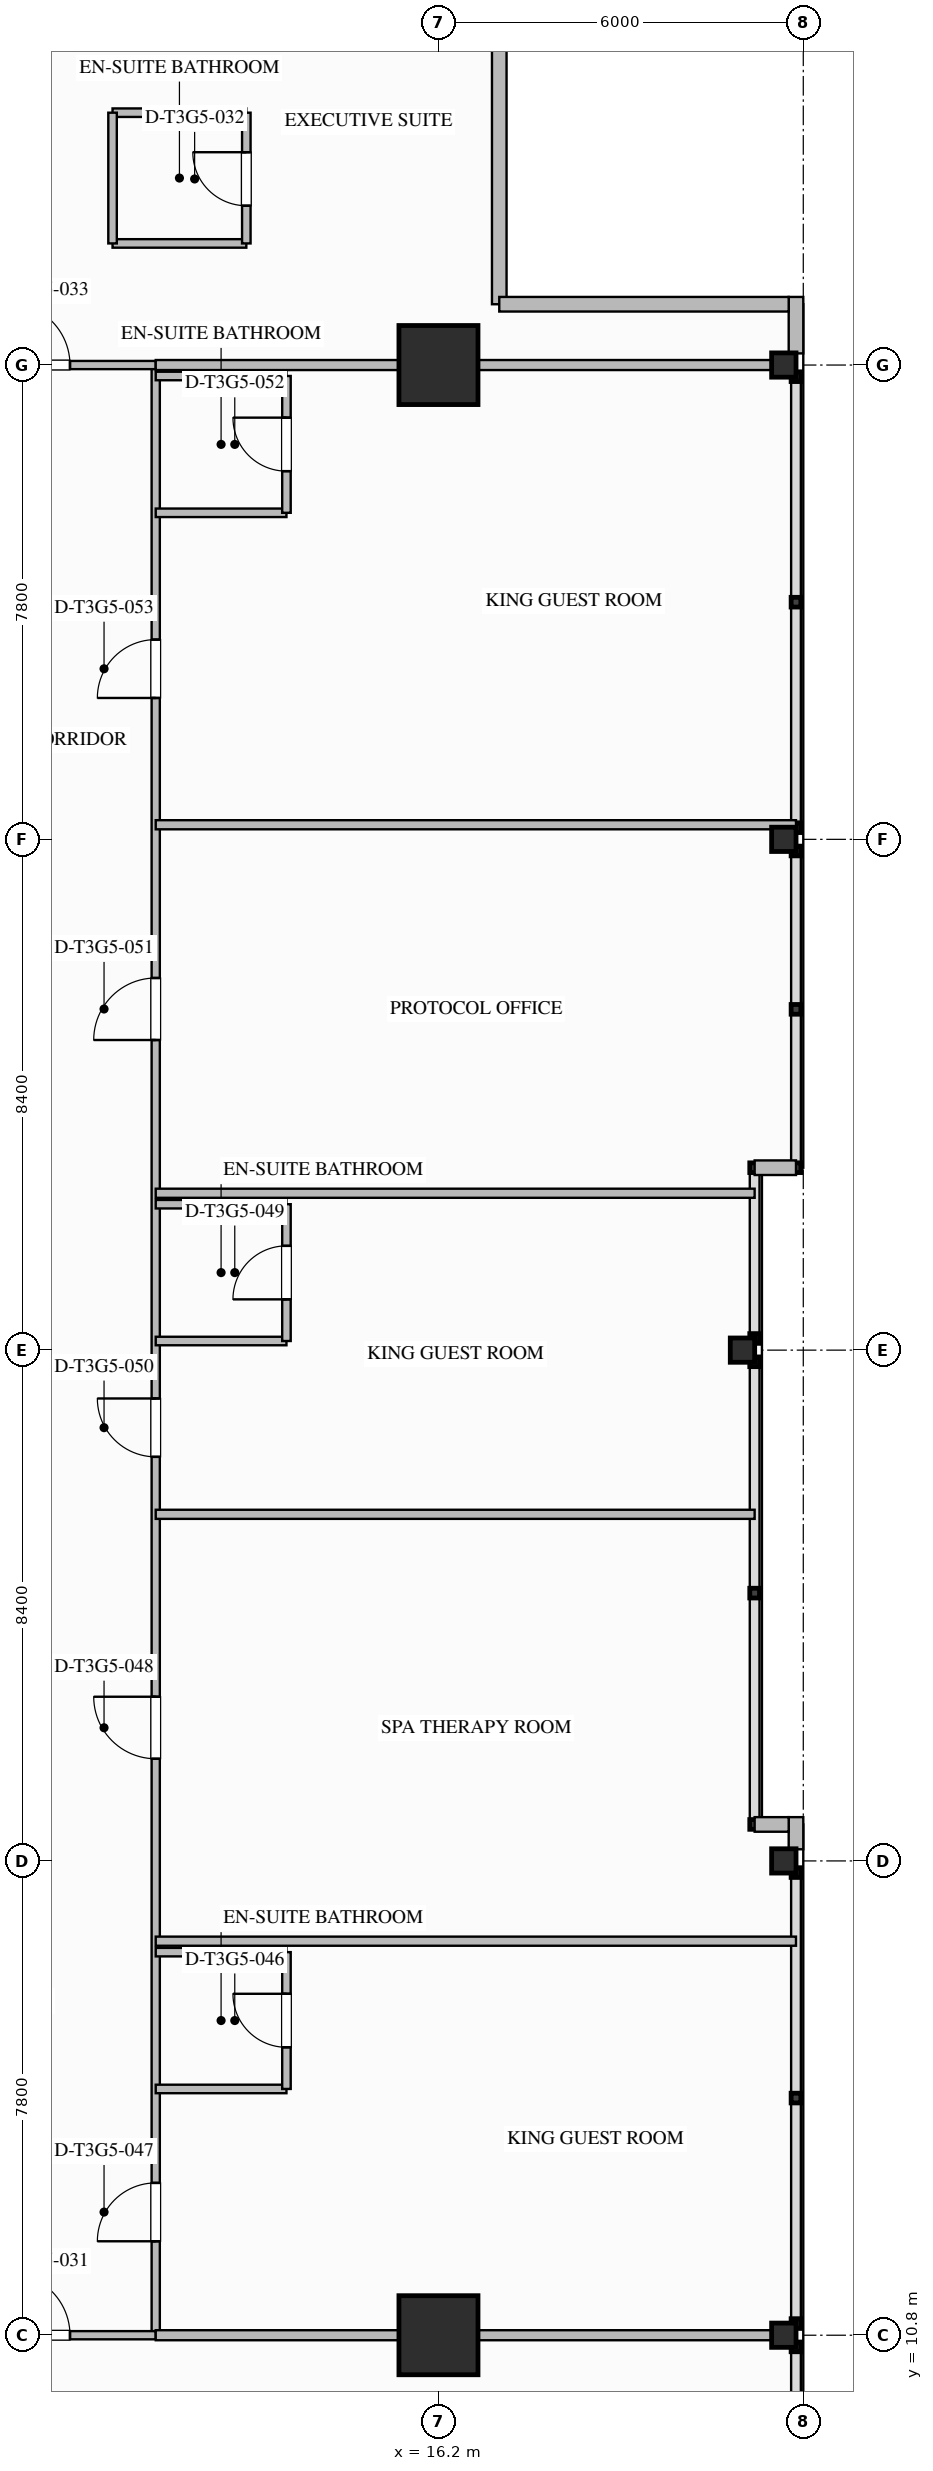
"""IFC4 building model, lengths in metres.
Left out: names, types, materials, properties, quantities, classifications, styles, units other than length and angle.
Written with IfcOpenShell. Run it as: python <this file> out.ifc"""

import sys

from ifc_helpers import new_model, si_unit, direction, frame, frame_2d, origin, origin_2d, place, context, subcontext, project, spatial, rectangle, i_section, extrude, element, fill, save


model = new_model("IFC4")
c1 = context("Model", 3, precision=1e-05, world=origin(), true_north=direction((0.0, 1.0)))
c2 = subcontext(c1, "Body", "Model", "MODEL_VIEW")
j1 = project(units=[si_unit("LENGTHUNIT", "METRE"), si_unit("PLANEANGLEUNIT", "RADIAN")], contexts=[c1])
p1 = place(None, origin())
s1 = spatial("IfcSite", under=j1, at=p1, CompositionType="ELEMENT")
p2 = place(p1, origin())
s2 = spatial("IfcBuilding", under=s1, at=p2, CompositionType="ELEMENT")
p3 = place(p2, frame((0.0, 0.0, 193.0)))
s3 = spatial("IfcBuildingStorey", under=s2, at=p3, CompositionType="ELEMENT", Elevation=193.0)
for number, where, z_axis, x_axis in (
    (1, (16.2, 10.8, 0.0), (0.0, 0.0, 1.0), (1.0, 0.0, 0.0)),
    (2, (16.2, 43.2, 0.0), (0.0, 0.0, 1.0), (1.0, 0.0, 0.0)),
):
    element("IfcColumn", number, at=place(p3, frame(where, z_axis=z_axis, x_axis=x_axis)), inside=s3, PredefinedType="COLUMN", context=c2, shape_type="SweptSolid", body=[
        extrude(rectangle(XDim=1.3, YDim=1.3, at=origin_2d()), origin(), (0.0, 0.0, 1.0), 3.55),
    ])
for number, where, z_axis, x_axis in (
    (3, (21.88, 10.8, 0.0), (0.0, 0.0, 1.0), (1.0, 0.0, 0.0)),
    (4, (21.88, 18.6, 0.0), (0.0, 0.0, 1.0), (1.0, 0.0, 0.0)),
    (5, (21.2, 27.0, 0.0), (0.0, 0.0, 1.0), (1.0, 0.0, 0.0)),
    (6, (21.88, 35.4, 0.0), (0.0, 0.0, 1.0), (1.0, 0.0, 0.0)),
    (7, (21.88, 43.2, 0.0), (0.0, 0.0, 1.0), (1.0, 0.0, 0.0)),
):
    element("IfcColumn", number, at=place(p3, frame(where, z_axis=z_axis, x_axis=x_axis)), inside=s3, PredefinedType="COLUMN", context=c2, shape_type="SweptSolid", body=[
        extrude(i_section(OverallWidth=0.401, OverallDepth=0.399, WebThickness=0.025, FlangeThickness=0.04, FilletRadius=0.025, at=origin_2d()), origin(), (0.0, 0.0, 1.0), 3.547),
    ])
p4 = place(p3, frame((22.08, 44.32, 0.0), z_axis=(0.0, 0.0, 1.0), x_axis=(0.0, -1.0, 0.0)))
e8 = element("IfcWall", 8, at=p4, inside=s3, PredefinedType="STANDARD", context=c2, shape_type="SweptSolid", body=[
    extrude(rectangle(XDim=0.928, YDim=0.24, at=frame_2d((0.464, 0.0))), origin(), (0.0, 0.0, 1.0), 3.29),
])
p5 = place(p3, frame((22.08, 19.32, 0.0), z_axis=(0.0, 0.0, 1.0), x_axis=(0.0, -1.0, 0.0)))
e9 = element("IfcWall", 9, at=p5, inside=s3, PredefinedType="STANDARD", context=c2, shape_type="SweptSolid", body=[
    extrude(rectangle(XDim=0.528, YDim=0.24, at=frame_2d((0.264, 0.0))), origin(), (0.0, 0.0, 1.0), 3.29),
])
for number, where, z_axis, x_axis in (
    (10, (17.2, 48.96, 0.0), (0.0, 0.0, 1.0), (0.0, -1.0, 0.0)),
    (11, (17.2, 44.2, 0.0), (0.0, 0.0, 1.0), (1.0, 0.0, 0.0)),
):
    element("IfcWall", number, at=place(p3, frame(where, z_axis=z_axis, x_axis=x_axis)), inside=s3, PredefinedType="STANDARD", context=c2, shape_type="SweptSolid", body=[
        extrude(rectangle(XDim=4.76, YDim=0.24, at=frame_2d((2.38, 0.0))), origin(), (0.0, 0.0, 1.0), 3.29),
    ])
p6 = place(p3, frame((22.08, 30.0, 0.0), z_axis=(0.0, 0.0, 1.0), x_axis=(-1.0, 0.0, 0.0)))
e12 = element("IfcWall", 12, at=p6, inside=s3, PredefinedType="STANDARD", context=c2, shape_type="SweptSolid", body=[
    extrude(rectangle(XDim=0.68, YDim=0.24, at=frame_2d((0.34, 0.0))), origin(), (0.0, 0.0, 1.0), 3.29),
])
p7 = place(p3, frame((21.4, 19.2, 0.0), z_axis=(0.0, 0.0, 1.0), x_axis=(1.0, 0.0, 0.0)))
e13 = element("IfcWall", 13, at=p7, inside=s3, PredefinedType="STANDARD", context=c2, shape_type="SweptSolid", body=[
    extrude(rectangle(XDim=0.56, YDim=0.24, at=frame_2d((0.28, 0.0))), origin(), (0.0, 0.0, 1.0), 3.29),
])
p8 = place(p3, frame((11.55, 10.8, 0.0), z_axis=(0.0, 0.0, 1.0), x_axis=(0.0, 1.0, 0.0)))
e14 = element("IfcWall", 14, at=p8, inside=s3, PredefinedType="PARTITIONING", context=c2, shape_type="SweptSolid", body=[
    extrude(rectangle(XDim=32.4, YDim=0.135, at=frame_2d((16.2, 0.0))), origin(), (0.0, 0.0, 1.0), 3.29),
])
p9 = place(p8, frame((1.545, 0.0, 0.0)))
e15 = element("IfcOpeningElement", 15, at=p9, cuts=e14, PredefinedType="OPENING", context=c2, shape_type="SweptSolid", body=[
    extrude(rectangle(XDim=0.96, YDim=2.15, at=frame_2d((0.48, 1.075))), frame((0.0, 0.077, 0.0), z_axis=(0.0, -1.0, 0.0), x_axis=(1.0, 0.0, 0.0)), (0.0, 0.0, 1.0), 0.155),
])
p10 = place(p8, frame((9.48, 0.0, 0.0)))
e16 = element("IfcOpeningElement", 16, at=p10, cuts=e14, PredefinedType="OPENING", context=c2, shape_type="SweptSolid", body=[
    extrude(rectangle(XDim=1.02, YDim=2.15, at=frame_2d((0.51, 1.075))), frame((0.0, 0.077, 0.0), z_axis=(0.0, -1.0, 0.0), x_axis=(1.0, 0.0, 0.0)), (0.0, 0.0, 1.0), 0.155),
])
p11 = place(p8, frame((14.445, 0.0, 0.0)))
e17 = element("IfcOpeningElement", 17, at=p11, cuts=e14, PredefinedType="OPENING", context=c2, shape_type="SweptSolid", body=[
    extrude(rectangle(XDim=0.96, YDim=2.15, at=frame_2d((0.48, 1.075))), frame((0.0, 0.077, 0.0), z_axis=(0.0, -1.0, 0.0), x_axis=(1.0, 0.0, 0.0)), (0.0, 0.0, 1.0), 0.155),
])
p12 = place(p8, frame((21.3, 0.0, 0.0)))
e18 = element("IfcOpeningElement", 18, at=p12, cuts=e14, PredefinedType="OPENING", context=c2, shape_type="SweptSolid", body=[
    extrude(rectangle(XDim=1.02, YDim=2.15, at=frame_2d((0.51, 1.075))), frame((0.0, 0.077, 0.0), z_axis=(0.0, -1.0, 0.0), x_axis=(1.0, 0.0, 0.0)), (0.0, 0.0, 1.0), 0.155),
])
p13 = place(p8, frame((26.925, 0.0, 0.0)))
e19 = element("IfcOpeningElement", 19, at=p13, cuts=e14, PredefinedType="OPENING", context=c2, shape_type="SweptSolid", body=[
    extrude(rectangle(XDim=0.96, YDim=2.15, at=frame_2d((0.48, 1.075))), frame((0.0, 0.077, 0.0), z_axis=(0.0, -1.0, 0.0), x_axis=(1.0, 0.0, 0.0)), (0.0, 0.0, 1.0), 0.155),
])
p14 = place(p3, frame((8.6, 10.8, 0.0), z_axis=(0.0, 0.0, 1.0), x_axis=(1.0, 0.0, 0.0)))
e20 = element("IfcWall", 20, at=p14, inside=s3, PredefinedType="PARTITIONING", context=c2, shape_type="SweptSolid", body=[
    extrude(rectangle(XDim=2.95, YDim=0.135, at=frame_2d((1.475, 0.0))), origin(), (0.0, 0.0, 1.0), 2.58),
])
p15 = place(p14, frame((0.52, 0.0, 0.0)))
e21 = element("IfcOpeningElement", 21, at=p15, cuts=e20, PredefinedType="OPENING", context=c2, shape_type="SweptSolid", body=[
    extrude(rectangle(XDim=1.02, YDim=2.15, at=frame_2d((0.51, 1.075))), frame((0.0, 0.077, 0.0), z_axis=(0.0, -1.0, 0.0), x_axis=(1.0, 0.0, 0.0)), (0.0, 0.0, 1.0), 0.155),
])
p16 = place(p3, frame((8.6, 43.2, 0.0), z_axis=(0.0, 0.0, 1.0), x_axis=(1.0, 0.0, 0.0)))
e22 = element("IfcWall", 22, at=p16, inside=s3, PredefinedType="PARTITIONING", context=c2, shape_type="SweptSolid", body=[
    extrude(rectangle(XDim=2.95, YDim=0.135, at=frame_2d((1.475, 0.0))), origin(), (0.0, 0.0, 1.0), 2.58),
])
p17 = place(p16, frame((0.52, 0.0, 0.0)))
e23 = element("IfcOpeningElement", 23, at=p17, cuts=e22, PredefinedType="OPENING", context=c2, shape_type="SweptSolid", body=[
    extrude(rectangle(XDim=1.02, YDim=2.15, at=frame_2d((0.51, 1.075))), frame((0.0, 0.077, 0.0), z_axis=(0.0, -1.0, 0.0), x_axis=(1.0, 0.0, 0.0)), (0.0, 0.0, 1.0), 0.155),
])
for number, where, z_axis, x_axis in (
    (24, (11.55, 10.8, 0.0), (0.0, 0.0, 1.0), (1.0, 0.0, 0.0)),
    (25, (11.55, 43.2, 0.0), (0.0, 0.0, 1.0), (1.0, 0.0, 0.0)),
):
    element("IfcWall", number, at=place(p3, frame(where, z_axis=z_axis, x_axis=x_axis)), inside=s3, PredefinedType="PARTITIONING", context=c2, shape_type="SweptSolid", body=[
        extrude(rectangle(XDim=10.53, YDim=0.165, at=frame_2d((5.265, 0.0))), origin(), (0.0, 0.0, 1.0), 2.58),
    ])
for number, where, z_axis, x_axis in (
    (26, (10.84, 45.2, 0.0), (0.0, 0.0, 1.0), (1.0, 0.0, 0.0)),
    (27, (10.84, 47.35, 0.0), (0.0, 0.0, 1.0), (1.0, 0.0, 0.0)),
):
    element("IfcWall", number, at=place(p3, frame(where, z_axis=z_axis, x_axis=x_axis)), inside=s3, PredefinedType="PLUMBINGWALL", context=c2, shape_type="SweptSolid", body=[
        extrude(rectangle(XDim=2.2, YDim=0.14, at=frame_2d((1.1, 0.0))), origin(), (0.0, 0.0, 1.0), 3.29),
    ])
p18 = place(p3, frame((10.84, 45.2, 0.0), z_axis=(0.0, 0.0, 1.0), x_axis=(0.0, 1.0, 0.0)))
e28 = element("IfcWall", 28, at=p18, inside=s3, PredefinedType="PLUMBINGWALL", context=c2, shape_type="SweptSolid", body=[
    extrude(rectangle(XDim=2.15, YDim=0.14, at=frame_2d((1.075, 0.0))), origin(), (0.0, 0.0, 1.0), 3.29),
])
p19 = place(p3, frame((13.04, 45.2, 0.0), z_axis=(0.0, 0.0, 1.0), x_axis=(0.0, 1.0, 0.0)))
e29 = element("IfcWall", 29, at=p19, inside=s3, PredefinedType="PLUMBINGWALL", context=c2, shape_type="SweptSolid", body=[
    extrude(rectangle(XDim=2.15, YDim=0.14, at=frame_2d((1.075, 0.0))), origin(), (0.0, 0.0, 1.0), 3.29),
])
p20 = place(p19, frame((0.62, 0.0, 0.0)))
e30 = element("IfcOpeningElement", 30, at=p20, cuts=e29, PredefinedType="OPENING", context=c2, shape_type="SweptSolid", body=[
    extrude(rectangle(XDim=0.88, YDim=2.1, at=frame_2d((0.44, 1.05))), frame((0.0, 0.08, 0.0), z_axis=(0.0, -1.0, 0.0), x_axis=(1.0, 0.0, 0.0)), (0.0, 0.0, 1.0), 0.16),
])
p21 = place(p3, frame((11.55, 14.85, 0.0), z_axis=(0.0, 0.0, 1.0), x_axis=(1.0, 0.0, 0.0)))
e31 = element("IfcWall", 31, at=p21, inside=s3, PredefinedType="PLUMBINGWALL", context=c2, shape_type="SweptSolid", body=[
    extrude(rectangle(XDim=2.15, YDim=0.14, at=frame_2d((1.075, 0.0))), origin(), (0.0, 0.0, 1.0), 2.868),
])
p22 = place(p3, frame((11.55, 17.1, 0.0), z_axis=(0.0, 0.0, 1.0), x_axis=(1.0, 0.0, 0.0)))
e32 = element("IfcWall", 32, at=p22, inside=s3, PredefinedType="PLUMBINGWALL", context=c2, shape_type="SweptSolid", body=[
    extrude(rectangle(XDim=2.15, YDim=0.14, at=frame_2d((1.075, 0.0))), origin(), (0.0, 0.0, 1.0), 3.29),
])
p23 = place(p3, frame((13.7, 14.85, 0.0), z_axis=(0.0, 0.0, 1.0), x_axis=(0.0, 1.0, 0.0)))
e33 = element("IfcWall", 33, at=p23, inside=s3, PredefinedType="PLUMBINGWALL", context=c2, shape_type="SweptSolid", body=[
    extrude(rectangle(XDim=2.25, YDim=0.14, at=frame_2d((1.125, 0.0))), origin(), (0.0, 0.0, 1.0), 3.29),
])
p24 = place(p23, frame((0.685, 0.0, 0.0)))
e34 = element("IfcOpeningElement", 34, at=p24, cuts=e33, PredefinedType="OPENING", context=c2, shape_type="SweptSolid", body=[
    extrude(rectangle(XDim=0.88, YDim=2.1, at=frame_2d((0.44, 1.05))), frame((0.0, 0.08, 0.0), z_axis=(0.0, -1.0, 0.0), x_axis=(1.0, 0.0, 0.0)), (0.0, 0.0, 1.0), 0.16),
])
p25 = place(p3, frame((11.55, 17.28, 0.0), z_axis=(0.0, 0.0, 1.0), x_axis=(1.0, 0.0, 0.0)))
e35 = element("IfcWall", 35, at=p25, inside=s3, PredefinedType="PARTITIONING", context=c2, shape_type="SweptSolid", body=[
    extrude(rectangle(XDim=10.53, YDim=0.15, at=frame_2d((5.265, 0.0))), origin(), (0.0, 0.0, 1.0), 3.29),
])
p26 = place(p3, frame((11.55, 24.3, 0.0), z_axis=(0.0, 0.0, 1.0), x_axis=(1.0, 0.0, 0.0)))
e36 = element("IfcWall", 36, at=p26, inside=s3, PredefinedType="PARTITIONING", context=c2, shape_type="SweptSolid", body=[
    extrude(rectangle(XDim=9.85, YDim=0.15, at=frame_2d((4.925, 0.0))), origin(), (0.0, 0.0, 1.0), 3.29),
])
p27 = place(p3, frame((11.55, 27.15, 0.0), z_axis=(0.0, 0.0, 1.0), x_axis=(1.0, 0.0, 0.0)))
e37 = element("IfcWall", 37, at=p27, inside=s3, PredefinedType="PLUMBINGWALL", context=c2, shape_type="SweptSolid", body=[
    extrude(rectangle(XDim=2.15, YDim=0.14, at=frame_2d((1.075, 0.0))), origin(), (0.0, 0.0, 1.0), 2.667),
])
p28 = place(p3, frame((11.55, 29.4, 0.0), z_axis=(0.0, 0.0, 1.0), x_axis=(1.0, 0.0, 0.0)))
e38 = element("IfcWall", 38, at=p28, inside=s3, PredefinedType="PLUMBINGWALL", context=c2, shape_type="SweptSolid", body=[
    extrude(rectangle(XDim=2.15, YDim=0.14, at=frame_2d((1.075, 0.0))), origin(), (0.0, 0.0, 1.0), 3.29),
])
p29 = place(p3, frame((13.7, 27.15, 0.0), z_axis=(0.0, 0.0, 1.0), x_axis=(0.0, 1.0, 0.0)))
e39 = element("IfcWall", 39, at=p29, inside=s3, PredefinedType="PLUMBINGWALL", context=c2, shape_type="SweptSolid", body=[
    extrude(rectangle(XDim=2.25, YDim=0.14, at=frame_2d((1.125, 0.0))), origin(), (0.0, 0.0, 1.0), 3.29),
])
p30 = place(p29, frame((0.685, 0.0, 0.0)))
e40 = element("IfcOpeningElement", 40, at=p30, cuts=e39, PredefinedType="OPENING", context=c2, shape_type="SweptSolid", body=[
    extrude(rectangle(XDim=0.88, YDim=2.1, at=frame_2d((0.44, 1.05))), frame((0.0, 0.08, 0.0), z_axis=(0.0, -1.0, 0.0), x_axis=(1.0, 0.0, 0.0)), (0.0, 0.0, 1.0), 0.16),
])
p31 = place(p3, frame((11.55, 29.58, 0.0), z_axis=(0.0, 0.0, 1.0), x_axis=(1.0, 0.0, 0.0)))
e41 = element("IfcWall", 41, at=p31, inside=s3, PredefinedType="PARTITIONING", context=c2, shape_type="SweptSolid", body=[
    extrude(rectangle(XDim=9.85, YDim=0.15, at=frame_2d((4.925, 0.0))), origin(), (0.0, 0.0, 1.0), 3.29),
])
p32 = place(p3, frame((11.55, 35.64, 0.0), z_axis=(0.0, 0.0, 1.0), x_axis=(1.0, 0.0, 0.0)))
e42 = element("IfcWall", 42, at=p32, inside=s3, PredefinedType="PARTITIONING", context=c2, shape_type="SweptSolid", body=[
    extrude(rectangle(XDim=10.53, YDim=0.15, at=frame_2d((5.265, 0.0))), origin(), (0.0, 0.0, 1.0), 2.58),
])
p33 = place(p3, frame((11.55, 40.77, 0.0), z_axis=(0.0, 0.0, 1.0), x_axis=(1.0, 0.0, 0.0)))
e43 = element("IfcWall", 43, at=p33, inside=s3, PredefinedType="PLUMBINGWALL", context=c2, shape_type="SweptSolid", body=[
    extrude(rectangle(XDim=2.15, YDim=0.14, at=frame_2d((1.075, 0.0))), origin(), (0.0, 0.0, 1.0), 3.29),
])
p34 = place(p3, frame((11.55, 43.02, 0.0), z_axis=(0.0, 0.0, 1.0), x_axis=(1.0, 0.0, 0.0)))
e44 = element("IfcWall", 44, at=p34, inside=s3, PredefinedType="PLUMBINGWALL", context=c2, shape_type="SweptSolid", body=[
    extrude(rectangle(XDim=2.15, YDim=0.14, at=frame_2d((1.075, 0.0))), origin(), (0.0, 0.0, 1.0), 2.58),
])
p35 = place(p3, frame((13.7, 40.77, 0.0), z_axis=(0.0, 0.0, 1.0), x_axis=(0.0, 1.0, 0.0)))
e45 = element("IfcWall", 45, at=p35, inside=s3, PredefinedType="PLUMBINGWALL", context=c2, shape_type="SweptSolid", body=[
    extrude(rectangle(XDim=2.25, YDim=0.14, at=frame_2d((1.125, 0.0))), origin(), (0.0, 0.0, 1.0), 3.29),
])
p36 = place(p35, frame((0.685, 0.0, 0.0)))
e46 = element("IfcOpeningElement", 46, at=p36, cuts=e45, PredefinedType="OPENING", context=c2, shape_type="SweptSolid", body=[
    extrude(rectangle(XDim=0.88, YDim=2.1, at=frame_2d((0.44, 1.05))), frame((0.0, 0.08, 0.0), z_axis=(0.0, -1.0, 0.0), x_axis=(1.0, 0.0, 0.0)), (0.0, 0.0, 1.0), 0.16),
])
p37 = place(p15, origin())
e47 = element("IfcDoor", 47, at=p37, inside=s3, OperationType="SINGLE_SWING_LEFT", PredefinedType="DOOR", context=c2, shape_type="SweptSolid", body=[
    extrude(rectangle(XDim=1.02, YDim=2.15, at=frame_2d((0.51, 1.075))), frame((0.0, 0.025, 0.0), z_axis=(0.0, -1.0, 0.0), x_axis=(1.0, 0.0, 0.0)), (0.0, 0.0, 1.0), 0.05),
])
fill(e21, e47)
p38 = place(p20, origin())
e48 = element("IfcDoor", 48, at=p38, inside=s3, OperationType="SINGLE_SWING_RIGHT", PredefinedType="DOOR", context=c2, shape_type="SweptSolid", body=[
    extrude(rectangle(XDim=0.88, YDim=2.1, at=frame_2d((0.44, 1.05))), frame((0.0, 0.025, 0.0), z_axis=(0.0, -1.0, 0.0), x_axis=(1.0, 0.0, 0.0)), (0.0, 0.0, 1.0), 0.05),
])
fill(e30, e48)
p39 = place(p17, origin())
e49 = element("IfcDoor", 49, at=p39, inside=s3, OperationType="SINGLE_SWING_LEFT", PredefinedType="DOOR", context=c2, shape_type="SweptSolid", body=[
    extrude(rectangle(XDim=1.02, YDim=2.15, at=frame_2d((0.51, 1.075))), frame((0.0, 0.025, 0.0), z_axis=(0.0, -1.0, 0.0), x_axis=(1.0, 0.0, 0.0)), (0.0, 0.0, 1.0), 0.05),
])
fill(e23, e49)
p40 = place(p24, origin())
e50 = element("IfcDoor", 50, at=p40, inside=s3, OperationType="SINGLE_SWING_RIGHT", PredefinedType="DOOR", context=c2, shape_type="SweptSolid", body=[
    extrude(rectangle(XDim=0.88, YDim=2.1, at=frame_2d((0.44, 1.05))), frame((0.0, 0.025, 0.0), z_axis=(0.0, -1.0, 0.0), x_axis=(1.0, 0.0, 0.0)), (0.0, 0.0, 1.0), 0.05),
])
fill(e34, e50)
p41 = place(p9, origin())
e51 = element("IfcDoor", 51, at=p41, inside=s3, OperationType="SINGLE_SWING_LEFT", PredefinedType="DOOR", context=c2, shape_type="SweptSolid", body=[
    extrude(rectangle(XDim=0.96, YDim=2.15, at=frame_2d((0.48, 1.075))), frame((0.0, 0.025, 0.0), z_axis=(0.0, -1.0, 0.0), x_axis=(1.0, 0.0, 0.0)), (0.0, 0.0, 1.0), 0.05),
])
fill(e15, e51)
p42 = place(p10, origin())
e52 = element("IfcDoor", 52, at=p42, inside=s3, OperationType="SINGLE_SWING_RIGHT", PredefinedType="DOOR", context=c2, shape_type="SweptSolid", body=[
    extrude(rectangle(XDim=1.02, YDim=2.15, at=frame_2d((0.51, 1.075))), frame((0.0, 0.025, 0.0), z_axis=(0.0, -1.0, 0.0), x_axis=(1.0, 0.0, 0.0)), (0.0, 0.0, 1.0), 0.05),
])
fill(e16, e52)
p43 = place(p30, origin())
e53 = element("IfcDoor", 53, at=p43, inside=s3, OperationType="SINGLE_SWING_LEFT", PredefinedType="DOOR", context=c2, shape_type="SweptSolid", body=[
    extrude(rectangle(XDim=0.88, YDim=2.1, at=frame_2d((0.44, 1.05))), frame((0.0, 0.025, 0.0), z_axis=(0.0, -1.0, 0.0), x_axis=(1.0, 0.0, 0.0)), (0.0, 0.0, 1.0), 0.05),
])
fill(e40, e53)
p44 = place(p11, origin())
e54 = element("IfcDoor", 54, at=p44, inside=s3, OperationType="SINGLE_SWING_RIGHT", PredefinedType="DOOR", context=c2, shape_type="SweptSolid", body=[
    extrude(rectangle(XDim=0.96, YDim=2.15, at=frame_2d((0.48, 1.075))), frame((0.0, 0.025, 0.0), z_axis=(0.0, -1.0, 0.0), x_axis=(1.0, 0.0, 0.0)), (0.0, 0.0, 1.0), 0.05),
])
fill(e17, e54)
p45 = place(p12, origin())
e55 = element("IfcDoor", 55, at=p45, inside=s3, OperationType="SINGLE_SWING_LEFT", PredefinedType="DOOR", context=c2, shape_type="SweptSolid", body=[
    extrude(rectangle(XDim=1.02, YDim=2.15, at=frame_2d((0.51, 1.075))), frame((0.0, 0.025, 0.0), z_axis=(0.0, -1.0, 0.0), x_axis=(1.0, 0.0, 0.0)), (0.0, 0.0, 1.0), 0.05),
])
fill(e18, e55)
p46 = place(p36, origin())
e56 = element("IfcDoor", 56, at=p46, inside=s3, OperationType="SINGLE_SWING_RIGHT", PredefinedType="DOOR", context=c2, shape_type="SweptSolid", body=[
    extrude(rectangle(XDim=0.88, YDim=2.1, at=frame_2d((0.44, 1.05))), frame((0.0, 0.025, 0.0), z_axis=(0.0, -1.0, 0.0), x_axis=(1.0, 0.0, 0.0)), (0.0, 0.0, 1.0), 0.05),
])
fill(e46, e56)
p47 = place(p13, origin())
e57 = element("IfcDoor", 57, at=p47, inside=s3, OperationType="SINGLE_SWING_LEFT", PredefinedType="DOOR", context=c2, shape_type="SweptSolid", body=[
    extrude(rectangle(XDim=0.96, YDim=2.15, at=frame_2d((0.48, 1.075))), frame((0.0, 0.025, 0.0), z_axis=(0.0, -1.0, 0.0), x_axis=(1.0, 0.0, 0.0)), (0.0, 0.0, 1.0), 0.05),
])
fill(e19, e57)
save(model, sys.argv[1])
